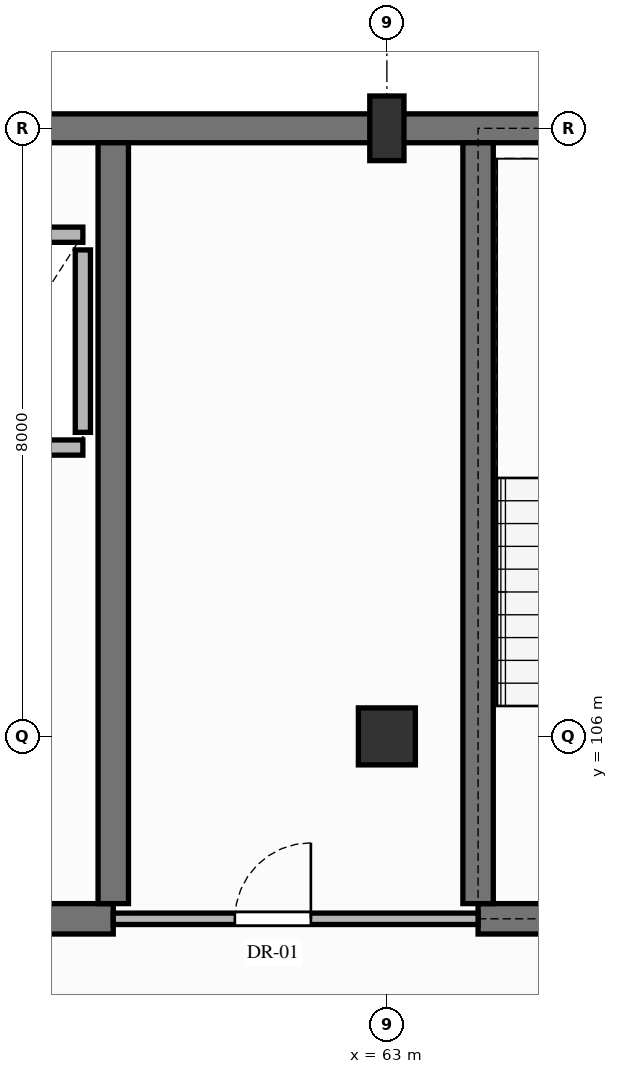
"""IFC4 building model, lengths in metres.
Left out: names, types, materials, properties, quantities, classifications, styles, units other than length and angle.
Written with IfcOpenShell. Run it as: python <this file> out.ifc"""

import sys

from ifc_helpers import new_model, si_unit, direction, frame, frame_2d, origin, origin_2d, place, context, subcontext, project, spatial, rectangle, extrude, element, fill, save


model = new_model("IFC4")
c1 = context("Model", 3, precision=1e-05, world=origin(), true_north=direction((0.0, 1.0)))
c2 = subcontext(c1, "Body", "Model", "MODEL_VIEW")
j1 = project(units=[si_unit("LENGTHUNIT", "METRE"), si_unit("PLANEANGLEUNIT", "RADIAN")], contexts=[c1])
p1 = place(None, origin())
s1 = spatial("IfcSite", under=j1, at=p1, CompositionType="ELEMENT")
p2 = place(p1, origin())
s2 = spatial("IfcBuilding", under=s1, at=p2, CompositionType="ELEMENT")
p3 = place(p2, frame((0.0, 0.0, 8.94)))
s3 = spatial("IfcBuildingStorey", under=s2, at=p3, CompositionType="ELEMENT", Elevation=8.94)
p4 = place(p3, frame((63.0, 106.0, 0.0), z_axis=(0.0, 0.0, 1.0), x_axis=(1.0, 0.0, 0.0)))
e1 = element("IfcColumn", 1, at=p4, inside=s3, PredefinedType="COLUMN", context=c2, shape_type="SweptSolid", body=[
    extrude(rectangle(XDim=0.75, YDim=0.75, at=origin_2d()), origin(), (0.0, 0.0, 1.0), 3.84),
])
p5 = place(p3, frame((63.0, 114.0, 0.0), z_axis=(0.0, 0.0, 1.0), x_axis=(0.0, 1.0, 0.0)))
e2 = element("IfcColumn", 2, at=p5, inside=s3, PredefinedType="COLUMN", context=c2, shape_type="SweptSolid", body=[
    extrude(rectangle(XDim=0.45, YDim=0.85, at=origin_2d()), origin(), (0.0, 0.0, 1.0), 3.84),
])
for number, where, z_axis, x_axis in (
    (3, (54.0, 114.0, 0.0), (0.0, 0.0, 1.0), (1.0, 0.0, 0.0)),
    (4, (63.0, 114.0, 0.0), (0.0, 0.0, 1.0), (1.0, 0.0, 0.0)),
):
    element("IfcWall", number, at=place(p3, frame(where, z_axis=z_axis, x_axis=x_axis)), inside=s3, PredefinedType="SOLIDWALL", context=c2, shape_type="SweptSolid", body=[
        extrude(rectangle(XDim=9.0, YDim=0.38, at=frame_2d((4.5, 0.0))), origin(), (0.0, 0.0, 1.0), 3.53),
    ])
p6 = place(p3, frame((46.2, 103.6, 0.0), z_axis=(0.0, 0.0, 1.0), x_axis=(1.0, 0.0, 0.0)))
e5 = element("IfcWall", 5, at=p6, inside=s3, PredefinedType="SHEAR", context=c2, shape_type="SweptSolid", body=[
    extrude(rectangle(XDim=13.2, YDim=0.4, at=frame_2d((6.6, 0.0))), origin(), (0.0, 0.0, 1.0), 3.53),
])
p7 = place(p6, frame((5.8, 0.0, 0.0)))
e6 = element("IfcOpeningElement", 6, at=p7, cuts=e5, PredefinedType="OPENING", context=c2, shape_type="SweptSolid", body=[
    extrude(rectangle(XDim=1.5, YDim=2.2, at=frame_2d((0.75, 1.1))), frame((0.0, 0.21, 0.0), z_axis=(0.0, -1.0, 0.0), x_axis=(1.0, 0.0, 0.0)), (0.0, 0.0, 1.0), 0.42),
])
p8 = place(p3, frame((59.4, 103.8, 0.0), z_axis=(0.0, 0.0, 1.0), x_axis=(0.0, 1.0, 0.0)))
e7 = element("IfcWall", 7, at=p8, inside=s3, PredefinedType="SHEAR", context=c2, shape_type="SweptSolid", body=[
    extrude(rectangle(XDim=10.01, YDim=0.4, at=frame_2d((5.005, 0.0))), origin(), (0.0, 0.0, 1.0), 3.53),
])
p9 = place(p3, frame((57.2, 109.8, 0.0), z_axis=(0.0, 0.0, 1.0), x_axis=(1.0, 0.0, 0.0)))
e8 = element("IfcWall", 8, at=p9, inside=s3, PredefinedType="PARTITIONING", context=c2, shape_type="SweptSolid", body=[
    extrude(rectangle(XDim=1.8, YDim=0.2, at=frame_2d((0.9, 0.0))), origin(), (0.0, 0.0, 1.0), 3.53),
])
p10 = place(p9, frame((0.45, 0.0, 0.0)))
e9 = element("IfcOpeningElement", 9, at=p10, cuts=e8, PredefinedType="OPENING", context=c2, shape_type="SweptSolid", body=[
    extrude(rectangle(XDim=0.9, YDim=2.1, at=frame_2d((0.45, 1.05))), frame((0.0, 0.11, 0.0), z_axis=(0.0, -1.0, 0.0), x_axis=(1.0, 0.0, 0.0)), (0.0, 0.0, 1.0), 0.22),
])
p11 = place(p3, frame((57.2, 112.6, 0.0), z_axis=(0.0, 0.0, 1.0), x_axis=(1.0, 0.0, 0.0)))
e10 = element("IfcWall", 10, at=p11, inside=s3, PredefinedType="PARTITIONING", context=c2, shape_type="SweptSolid", body=[
    extrude(rectangle(XDim=1.8, YDim=0.2, at=frame_2d((0.9, 0.0))), origin(), (0.0, 0.0, 1.0), 3.53),
])
p12 = place(p3, frame((59.0, 110.0, 0.0), z_axis=(0.0, 0.0, 1.0), x_axis=(0.0, 1.0, 0.0)))
e11 = element("IfcWall", 11, at=p12, inside=s3, PredefinedType="PARTITIONING", context=c2, shape_type="SweptSolid", body=[
    extrude(rectangle(XDim=2.4, YDim=0.2, at=frame_2d((1.2, 0.0))), origin(), (0.0, 0.0, 1.0), 3.53),
])
p13 = place(p3, frame((64.2, 103.6, 0.0), z_axis=(0.0, 0.0, 1.0), x_axis=(1.0, 0.0, 0.0)))
e12 = element("IfcWall", 12, at=p13, inside=s3, PredefinedType="SHEAR", context=c2, shape_type="SweptSolid", body=[
    extrude(rectangle(XDim=13.2, YDim=0.4, at=frame_2d((6.6, 0.0))), origin(), (0.0, 0.0, 1.0), 3.53),
])
p14 = place(p13, frame((5.8, 0.0, 0.0)))
e13 = element("IfcOpeningElement", 13, at=p14, cuts=e12, PredefinedType="OPENING", context=c2, shape_type="SweptSolid", body=[
    extrude(rectangle(XDim=1.5, YDim=2.2, at=frame_2d((0.75, 1.1))), frame((0.0, 0.21, 0.0), z_axis=(0.0, -1.0, 0.0), x_axis=(1.0, 0.0, 0.0)), (0.0, 0.0, 1.0), 0.42),
])
p15 = place(p3, frame((64.2, 103.8, 0.0), z_axis=(0.0, 0.0, 1.0), x_axis=(0.0, 1.0, 0.0)))
e14 = element("IfcWall", 14, at=p15, inside=s3, PredefinedType="SHEAR", context=c2, shape_type="SweptSolid", body=[
    extrude(rectangle(XDim=10.01, YDim=0.4, at=frame_2d((5.005, 0.0))), origin(), (0.0, 0.0, 1.0), 3.53),
])
p16 = place(p3, frame((59.4, 103.6, 0.0), z_axis=(0.0, 0.0, 1.0), x_axis=(1.0, 0.0, 0.0)))
e15 = element("IfcWall", 15, at=p16, inside=s3, PredefinedType="PARTITIONING", context=c2, shape_type="SweptSolid", body=[
    extrude(rectangle(XDim=4.8, YDim=0.15, at=frame_2d((2.4, 0.0))), origin(), (0.0, 0.0, 1.0), 3.53),
])
p17 = place(p16, frame((1.6, 0.0, 0.0)))
e16 = element("IfcOpeningElement", 16, at=p17, cuts=e15, PredefinedType="OPENING", context=c2, shape_type="SweptSolid", body=[
    extrude(rectangle(XDim=1.0, YDim=2.15, at=frame_2d((0.5, 1.075))), frame((0.0, 0.085, 0.0), z_axis=(0.0, -1.0, 0.0), x_axis=(1.0, 0.0, 0.0)), (0.0, 0.0, 1.0), 0.17),
])
p18 = place(p17, origin())
e17 = element("IfcDoor", 17, at=p18, inside=s3, OperationType="SINGLE_SWING_RIGHT", PredefinedType="DOOR", context=c2, shape_type="SweptSolid", body=[
    extrude(rectangle(XDim=1.0, YDim=2.15, at=frame_2d((0.5, 1.075))), frame((0.0, 0.025, 0.0), z_axis=(0.0, -1.0, 0.0), x_axis=(1.0, 0.0, 0.0)), (0.0, 0.0, 1.0), 0.05),
])
fill(e16, e17)
save(model, sys.argv[1])
